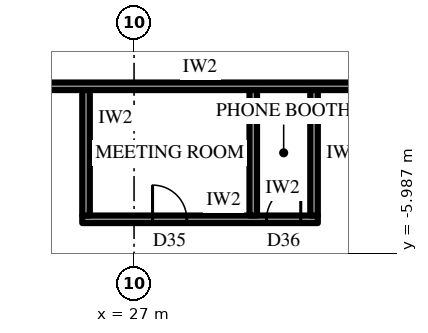
"""IFC4 building model, lengths in metres.
Left out: names, types, materials, properties, quantities, classifications, styles, units other than length and angle.
Written with IfcOpenShell. Run it as: python <this file> out.ifc"""

import sys

from ifc_helpers import new_model, si_unit, direction, frame, frame_2d, origin, place, context, subcontext, project, spatial, rectangle, extrude, element, fill, save


model = new_model("IFC4")
c1 = context("Model", 3, precision=1e-05, world=origin(), true_north=direction((0.0, 1.0)))
c2 = subcontext(c1, "Body", "Model", "MODEL_VIEW")
j1 = project(units=[si_unit("LENGTHUNIT", "METRE"), si_unit("PLANEANGLEUNIT", "RADIAN")], contexts=[c1])
p1 = place(None, origin())
s1 = spatial("IfcSite", under=j1, at=p1, CompositionType="ELEMENT")
p2 = place(p1, origin())
s2 = spatial("IfcBuilding", under=s1, at=p2, CompositionType="ELEMENT")
p3 = place(p2, frame((0.0, 0.0, 99.1)))
s3 = spatial("IfcBuildingStorey", under=s2, at=p3, CompositionType="ELEMENT", Elevation=99.1)
p4 = place(p3, frame((21.232, -30.925, 0.0), z_axis=(0.0, 0.0, 1.0), x_axis=(0.499999163675, 0.866025886636, 0.0)))
e1 = element("IfcWall", 1, at=p4, inside=s3, PredefinedType="SOLIDWALL", context=c2, shape_type="SweptSolid", body=[
    extrude(rectangle(XDim=32.332, YDim=0.3, at=frame_2d((16.166, 0.0))), origin(), (0.0, 0.0, 1.0), 2.7),
])
p5 = place(p4, frame((1.319, 0.0, 0.6)))
e2 = element("IfcOpeningElement", 2, at=p5, cuts=e1, PredefinedType="OPENING", context=c2, shape_type="SweptSolid", body=[
    extrude(rectangle(XDim=2.75, YDim=1.85, at=frame_2d((1.375, 0.925))), frame((0.0, 0.16, 0.0), z_axis=(0.0, -1.0, 0.0), x_axis=(1.0, 0.0, 0.0)), (0.0, 0.0, 1.0), 0.32),
])
p6 = place(p4, frame((6.708, 0.0, 0.6)))
e3 = element("IfcOpeningElement", 3, at=p6, cuts=e1, PredefinedType="OPENING", context=c2, shape_type="SweptSolid", body=[
    extrude(rectangle(XDim=2.75, YDim=1.85, at=frame_2d((1.375, 0.925))), frame((0.0, 0.16, 0.0), z_axis=(0.0, -1.0, 0.0), x_axis=(1.0, 0.0, 0.0)), (0.0, 0.0, 1.0), 0.32),
])
p7 = place(p4, frame((12.872, 0.0, 0.0)))
e4 = element("IfcOpeningElement", 4, at=p7, cuts=e1, PredefinedType="OPENING", context=c2, shape_type="SweptSolid", body=[
    extrude(rectangle(XDim=1.2, YDim=2.4, at=frame_2d((0.6, 1.2))), frame((0.0, 0.16, 0.0), z_axis=(0.0, -1.0, 0.0), x_axis=(1.0, 0.0, 0.0)), (0.0, 0.0, 1.0), 0.32),
])
p8 = place(p4, frame((17.485, 0.0, 0.6)))
e5 = element("IfcOpeningElement", 5, at=p8, cuts=e1, PredefinedType="OPENING", context=c2, shape_type="SweptSolid", body=[
    extrude(rectangle(XDim=2.75, YDim=1.85, at=frame_2d((1.375, 0.925))), frame((0.0, 0.16, 0.0), z_axis=(0.0, -1.0, 0.0), x_axis=(1.0, 0.0, 0.0)), (0.0, 0.0, 1.0), 0.32),
])
p9 = place(p4, frame((22.874, 0.0, 0.6)))
e6 = element("IfcOpeningElement", 6, at=p9, cuts=e1, PredefinedType="OPENING", context=c2, shape_type="SweptSolid", body=[
    extrude(rectangle(XDim=2.75, YDim=1.85, at=frame_2d((1.375, 0.925))), frame((0.0, 0.16, 0.0), z_axis=(0.0, -1.0, 0.0), x_axis=(1.0, 0.0, 0.0)), (0.0, 0.0, 1.0), 0.32),
])
p10 = place(p4, frame((28.262, 0.0, 0.6)))
e7 = element("IfcOpeningElement", 7, at=p10, cuts=e1, PredefinedType="OPENING", context=c2, shape_type="SweptSolid", body=[
    extrude(rectangle(XDim=2.75, YDim=1.85, at=frame_2d((1.375, 0.925))), frame((0.0, 0.16, 0.0), z_axis=(0.0, -1.0, 0.0), x_axis=(1.0, 0.0, 0.0)), (0.0, 0.0, 1.0), 0.32),
])
p11 = place(p3, frame((21.1, -1.6, 0.0), z_axis=(0.0, 0.0, 1.0), x_axis=(1.0, 0.0, 0.0)))
e8 = element("IfcWall", 8, at=p11, inside=s3, PredefinedType="PARTITIONING", context=c2, shape_type="SweptSolid", body=[
    extrude(rectangle(XDim=15.273, YDim=0.2, at=frame_2d((7.636, 0.0))), origin(), (0.0, 0.0, 1.0), 4.0),
])
p12 = place(p11, frame((1.027, 0.0, 0.0)))
e9 = element("IfcOpeningElement", 9, at=p12, cuts=e8, PredefinedType="OPENING", context=c2, shape_type="SweptSolid", body=[
    extrude(rectangle(XDim=1.0, YDim=2.2, at=frame_2d((0.5, 1.1))), frame((0.0, 0.11, 0.0), z_axis=(0.0, -1.0, 0.0), x_axis=(1.0, 0.0, 0.0)), (0.0, 0.0, 1.0), 0.22),
])
p13 = place(p3, frame((25.636, -5.1, 0.0), z_axis=(0.0, 0.0, 1.0), x_axis=(1.0, 0.0, 0.0)))
e10 = element("IfcWall", 10, at=p13, inside=s3, PredefinedType="PARTITIONING", context=c2, shape_type="SweptSolid", body=[
    extrude(rectangle(XDim=6.2, YDim=0.2, at=frame_2d((3.1, 0.0))), origin(), (0.0, 0.0, 1.0), 4.0),
])
p14 = place(p13, frame((1.85, 0.0, 0.0)))
e11 = element("IfcOpeningElement", 11, at=p14, cuts=e10, PredefinedType="OPENING", context=c2, shape_type="SweptSolid", body=[
    extrude(rectangle(XDim=0.9, YDim=2.2, at=frame_2d((0.45, 1.1))), frame((0.0, 0.11, 0.0), z_axis=(0.0, -1.0, 0.0), x_axis=(1.0, 0.0, 0.0)), (0.0, 0.0, 1.0), 0.22),
])
p15 = place(p13, frame((4.85, 0.0, 0.0)))
e12 = element("IfcOpeningElement", 12, at=p15, cuts=e10, PredefinedType="OPENING", context=c2, shape_type="SweptSolid", body=[
    extrude(rectangle(XDim=0.9, YDim=2.2, at=frame_2d((0.45, 1.1))), frame((0.0, 0.11, 0.0), z_axis=(0.0, -1.0, 0.0), x_axis=(1.0, 0.0, 0.0)), (0.0, 0.0, 1.0), 0.22),
])
for number, where, z_axis, x_axis in (
    (13, (25.737, -1.7, 0.0), (0.0, 0.0, 1.0), (0.0, -1.0, 0.0)),
    (14, (30.136, -1.7, 0.0), (0.0, 0.0, 1.0), (0.0, -1.0, 0.0)),
    (15, (31.737, -1.7, 0.0), (0.0, 0.0, 1.0), (0.0, -1.0, 0.0)),
):
    element("IfcWall", number, at=place(p3, frame(where, z_axis=z_axis, x_axis=x_axis)), inside=s3, PredefinedType="PARTITIONING", context=c2, shape_type="SweptSolid", body=[
        extrude(rectangle(XDim=3.3, YDim=0.2, at=frame_2d((1.65, 0.0))), origin(), (0.0, 0.0, 1.0), 4.0),
    ])
p16 = place(p14, origin())
e16 = element("IfcDoor", 16, at=p16, inside=s3, OperationType="SINGLE_SWING_RIGHT", PredefinedType="DOOR", context=c2, shape_type="SweptSolid", body=[
    extrude(rectangle(XDim=0.9, YDim=2.2, at=frame_2d((0.45, 1.1))), frame((0.0, 0.025, 0.0), z_axis=(0.0, -1.0, 0.0), x_axis=(1.0, 0.0, 0.0)), (0.0, 0.0, 1.0), 0.05),
])
fill(e11, e16)
p17 = place(p15, origin())
e17 = element("IfcDoor", 17, at=p17, inside=s3, OperationType="SINGLE_SWING_LEFT", PredefinedType="DOOR", context=c2, shape_type="SweptSolid", body=[
    extrude(rectangle(XDim=0.9, YDim=2.2, at=frame_2d((0.45, 1.1))), frame((0.0, 0.025, 0.0), z_axis=(0.0, -1.0, 0.0), x_axis=(1.0, 0.0, 0.0)), (0.0, 0.0, 1.0), 0.05),
])
fill(e12, e17)
save(model, sys.argv[1])
